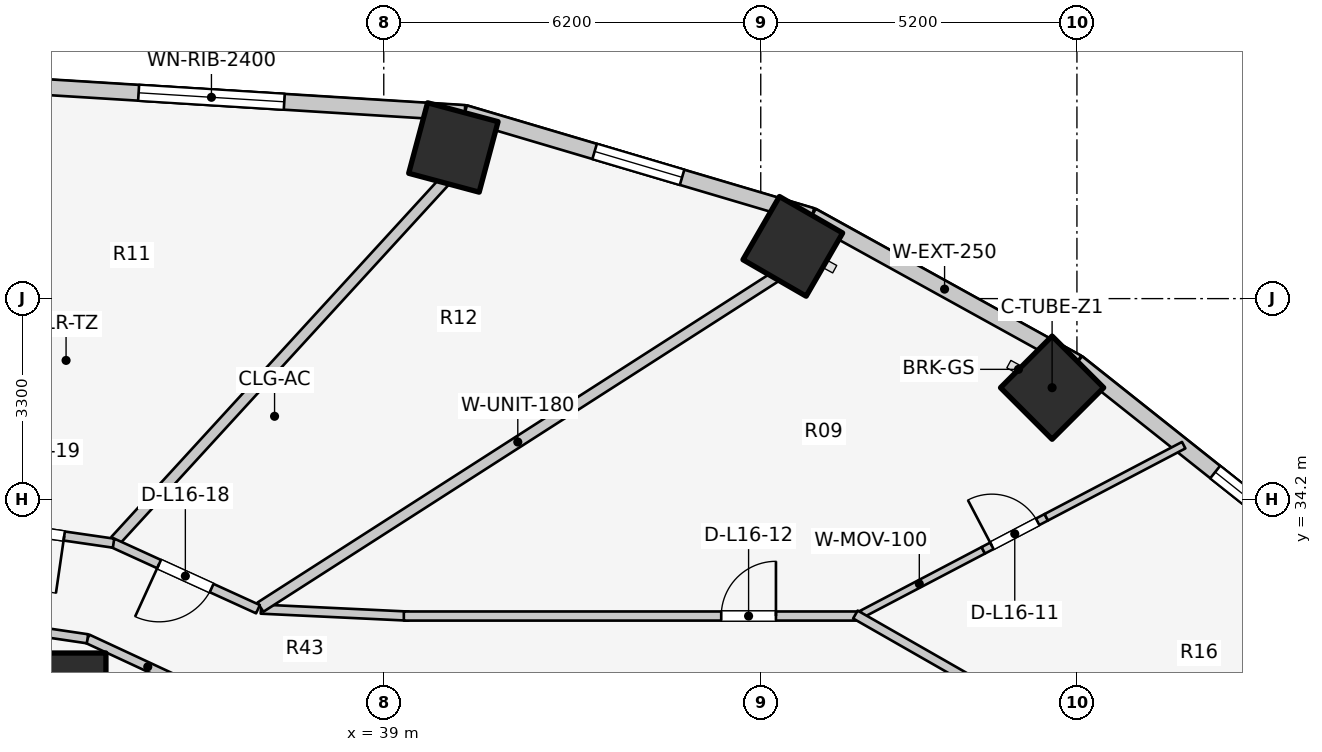
"""IFC4 building model, lengths in metres.
Left out: names, types, materials, properties, quantities, classifications, styles, units other than length and angle.
Written with IfcOpenShell. Run it as: python <this file> out.ifc"""

import sys

from ifc_helpers import new_model, si_unit, direction, frame, frame_2d, origin, origin_2d, place, context, subcontext, project, spatial, rectangle, extrude, element, fill, save


model = new_model("IFC4")
c1 = context("Model", 3, precision=1e-05, world=origin(), true_north=direction((0.0, 1.0)))
c2 = subcontext(c1, "Body", "Model", "MODEL_VIEW")
j1 = project(units=[si_unit("LENGTHUNIT", "METRE"), si_unit("PLANEANGLEUNIT", "RADIAN")], contexts=[c1])
p1 = place(None, origin())
s1 = spatial("IfcSite", under=j1, at=p1, CompositionType="ELEMENT")
p2 = place(p1, origin())
s2 = spatial("IfcBuilding", under=s1, at=p2, CompositionType="ELEMENT")
p3 = place(p2, frame((0.0, 0.0, 55.5)))
s3 = spatial("IfcBuildingStorey", under=s2, at=p3, CompositionType="ELEMENT", Elevation=55.5)
for number, where, z_axis, x_axis in (
    (1, (49.992, 36.035, 0.0), (0.0, 0.0, 1.0), (0.707, 0.707, 0.0)),
    (2, (45.727, 38.359, 0.0), (0.0, 0.0, 1.0), (0.5, 0.866, 0.0)),
):
    element("IfcColumn", number, at=place(p3, frame(where, z_axis=z_axis, x_axis=x_axis)), inside=s3, PredefinedType="COLUMN", context=c2, shape_type="SweptSolid", body=[
        extrude(rectangle(XDim=1.2, YDim=1.2, at=origin_2d()), origin(), (0.0, 0.0, 1.0), 3.1),
    ])
p4 = place(p3, frame((33.931, 31.172, 0.0), z_axis=(0.0, 0.0, 1.0), x_axis=(1.0, 0.0, 0.0)))
e3 = element("IfcColumn", 3, at=p4, inside=s3, PredefinedType="COLUMN", context=c2, shape_type="SweptSolid", body=[
    extrude(rectangle(XDim=1.0, YDim=1.0, at=origin_2d()), origin(), (0.0, 0.0, 1.0), 3.1),
])
p5 = place(p3, frame((40.145, 39.986, 0.0), z_axis=(0.0, 0.0, 1.0), x_axis=(0.258819045103, 0.965925826289, 0.0)))
e4 = element("IfcColumn", 4, at=p5, inside=s3, PredefinedType="COLUMN", context=c2, shape_type="SweptSolid", body=[
    extrude(rectangle(XDim=1.2, YDim=1.2, at=origin_2d()), origin(), (0.0, 0.0, 1.0), 3.1),
])
p6 = place(p3, frame((54.194, 33.441, 0.0), z_axis=(0.0, 0.0, 1.0), x_axis=(-0.783123133379, 0.621866672179, 0.0)))
e5 = element("IfcWall", 5, at=p6, inside=s3, PredefinedType="STANDARD", context=c2, shape_type="SweptSolid", body=[
    extrude(rectangle(XDim=4.839, YDim=0.26, at=frame_2d((2.419, 0.0))), origin(), (0.0, 0.0, 1.0), 2.85),
])
p7 = place(p6, frame((0.741, 0.0, 0.75)))
e6 = element("IfcOpeningElement", 6, at=p7, cuts=e5, PredefinedType="OPENING", context=c2, shape_type="SweptSolid", body=[
    extrude(rectangle(XDim=1.2, YDim=1.5, at=frame_2d((0.6, 0.75))), frame((0.0, 0.14, 0.0), z_axis=(0.0, -1.0, 0.0), x_axis=(1.0, 0.0, 0.0)), (0.0, 0.0, 1.0), 0.28),
])
p8 = place(p3, frame((50.405, 36.45, 0.0), z_axis=(0.0, 0.0, 1.0), x_axis=(-0.875137303239, 0.483874674352, 0.0)))
e7 = element("IfcWall", 7, at=p8, inside=s3, PredefinedType="STANDARD", context=c2, shape_type="SweptSolid", body=[
    extrude(rectangle(XDim=4.985, YDim=0.26, at=frame_2d((2.493, 0.0))), origin(), (0.0, 0.0, 1.0), 2.85),
])
p9 = place(p3, frame((46.042, 38.862, 0.0), z_axis=(0.0, 0.0, 1.0), x_axis=(-0.958843593522, 0.283934786811, 0.0)))
e8 = element("IfcWall", 8, at=p9, inside=s3, PredefinedType="STANDARD", context=c2, shape_type="SweptSolid", body=[
    extrude(rectangle(XDim=5.955, YDim=0.26, at=frame_2d((2.978, 0.0))), origin(), (0.0, 0.0, 1.0), 2.85),
])
p10 = place(p9, frame((2.228, 0.0, 0.75)))
e9 = element("IfcOpeningElement", 9, at=p10, cuts=e8, PredefinedType="OPENING", context=c2, shape_type="SweptSolid", body=[
    extrude(rectangle(XDim=1.5, YDim=1.6, at=frame_2d((0.75, 0.8))), frame((0.0, 0.14, 0.0), z_axis=(0.0, -1.0, 0.0), x_axis=(1.0, 0.0, 0.0)), (0.0, 0.0, 1.0), 0.28),
])
p11 = place(p3, frame((40.332, 40.553, 0.0), z_axis=(0.0, 0.0, 1.0), x_axis=(-0.998090514779, 0.061768311519, 0.0)))
e10 = element("IfcWall", 10, at=p11, inside=s3, PredefinedType="STANDARD", context=c2, shape_type="SweptSolid", body=[
    extrude(rectangle(XDim=8.348, YDim=0.26, at=frame_2d((4.174, 0.0))), origin(), (0.0, 0.0, 1.0), 2.85),
])
p12 = place(p11, frame((2.974, 0.0, 0.75)))
e11 = element("IfcOpeningElement", 11, at=p12, cuts=e10, PredefinedType="OPENING", context=c2, shape_type="SweptSolid", body=[
    extrude(rectangle(XDim=2.4, YDim=1.7, at=frame_2d((1.2, 0.85))), frame((0.0, 0.14, 0.0), z_axis=(0.0, -1.0, 0.0), x_axis=(1.0, 0.0, 0.0)), (0.0, 0.0, 1.0), 0.28),
])
p13 = place(p3, frame((36.11, 30.985, 0.0), z_axis=(0.0, 0.0, 1.0), x_axis=(-0.906943449489, 0.421252393975, 0.0)))
e12 = element("IfcWall", 12, at=p13, inside=s3, PredefinedType="PARTITIONING", context=c2, shape_type="SweptSolid", body=[
    extrude(rectangle(XDim=2.186, YDim=0.15, at=frame_2d((1.093, 0.0))), origin(), (0.0, 0.0, 1.0), 2.237),
])
p14 = place(p3, frame((34.127, 31.906, 0.0), z_axis=(0.0, 0.0, 1.0), x_axis=(-0.989268584896, 0.146108408166, 0.0)))
e13 = element("IfcWall", 13, at=p14, inside=s3, PredefinedType="PARTITIONING", context=c2, shape_type="SweptSolid", body=[
    extrude(rectangle(XDim=2.151, YDim=0.15, at=frame_2d((1.075, 0.0))), origin(), (0.0, 0.0, 1.0), 2.237),
])
p15 = place(p3, frame((46.756, 32.257, 0.0), z_axis=(0.0, 0.0, 1.0), x_axis=(0.885586030676, 0.464475383924, 0.0)))
e14 = element("IfcWall", 14, at=p15, inside=s3, PredefinedType="MOVABLE", context=c2, shape_type="SweptSolid", body=[
    extrude(rectangle(XDim=2.376, YDim=0.12, at=frame_2d((1.188, 0.0))), origin(), (0.0, 0.0, 1.0), 2.855),
])
p16 = place(p3, frame((48.86, 33.36, 0.0), z_axis=(0.0, 0.0, 1.0), x_axis=(0.885447282698, 0.464739829972, 0.0)))
e15 = element("IfcWall", 15, at=p16, inside=s3, PredefinedType="MOVABLE", context=c2, shape_type="SweptSolid", body=[
    extrude(rectangle(XDim=1.17, YDim=0.12, at=frame_2d((0.585, 0.0))), origin(), (0.0, 0.0, 1.0), 2.11),
])
p17 = place(p16, frame((0.16, 0.0, 0.0)))
e16 = element("IfcOpeningElement", 16, at=p17, cuts=e15, PredefinedType="OPENING", context=c2, shape_type="SweptSolid", body=[
    extrude(rectangle(XDim=0.85, YDim=2.05, at=frame_2d((0.425, 1.025))), frame((0.0, 0.07, 0.0), z_axis=(0.0, -1.0, 0.0), x_axis=(1.0, 0.0, 0.0)), (0.0, 0.0, 1.0), 0.14),
])
p18 = place(p3, frame((49.896, 33.904, 0.0), z_axis=(0.0, 0.0, 1.0), x_axis=(0.885573027611, 0.464500175208, 0.0)))
e17 = element("IfcWall", 17, at=p18, inside=s3, PredefinedType="MOVABLE", context=c2, shape_type="SweptSolid", body=[
    extrude(rectangle(XDim=2.552, YDim=0.12, at=frame_2d((1.276, 0.0))), origin(), (0.0, 0.0, 1.0), 2.855),
])
p19 = place(p3, frame((36.98, 32.394, 0.0), z_axis=(0.0, 0.0, 1.0), x_axis=(0.998877427952, -0.047369651964, 0.0)))
e18 = element("IfcWall", 18, at=p19, inside=s3, PredefinedType="PARTITIONING", context=c2, shape_type="SweptSolid", body=[
    extrude(rectangle(XDim=2.433, YDim=0.15, at=frame_2d((1.216, 0.0))), origin(), (0.0, 0.0, 1.0), 2.237),
])
p20 = place(p3, frame((39.33, 32.28, 0.0), z_axis=(0.0, 0.0, 1.0), x_axis=(1.0, 0.0, 0.0)))
e19 = element("IfcWall", 19, at=p20, inside=s3, PredefinedType="PARTITIONING", context=c2, shape_type="SweptSolid", body=[
    extrude(rectangle(XDim=7.52, YDim=0.15, at=frame_2d((3.76, 0.0))), origin(), (0.0, 0.0, 1.0), 2.237),
])
p21 = place(p20, frame((5.22, 0.0, 0.0)))
e20 = element("IfcOpeningElement", 20, at=p21, cuts=e19, PredefinedType="OPENING", context=c2, shape_type="SweptSolid", body=[
    extrude(rectangle(XDim=0.9, YDim=2.1, at=frame_2d((0.45, 1.05))), frame((0.0, 0.085, 0.0), z_axis=(0.0, -1.0, 0.0), x_axis=(1.0, 0.0, 0.0)), (0.0, 0.0, 1.0), 0.17),
])
p22 = place(p3, frame((46.757, 32.305, 0.0), z_axis=(0.0, 0.0, 1.0), x_axis=(0.867991349648, -0.496579315857, 0.0)))
e21 = element("IfcWall", 21, at=p22, inside=s3, PredefinedType="PARTITIONING", context=c2, shape_type="SweptSolid", body=[
    extrude(rectangle(XDim=2.567, YDim=0.15, at=frame_2d((1.283, 0.0))), origin(), (0.0, 0.0, 1.0), 2.069),
])
p23 = place(p3, frame((36.971, 32.426, 0.0), z_axis=(0.0, 0.0, 1.0), x_axis=(0.841689919529, 0.5399611832, 0.0)))
e22 = element("IfcWall", 22, at=p23, inside=s3, PredefinedType="PARTITIONING", context=c2, shape_type="SweptSolid", body=[
    extrude(rectangle(XDim=10.058, YDim=0.18, at=frame_2d((5.029, 0.0))), origin(), (0.0, 0.0, 1.0), 2.237),
])
p24 = place(p3, frame((34.586, 33.521, 0.0), z_axis=(0.0, 0.0, 1.0), x_axis=(0.675465011224, 0.737392038615, 0.0)))
e23 = element("IfcWall", 23, at=p24, inside=s3, PredefinedType="PARTITIONING", context=c2, shape_type="SweptSolid", body=[
    extrude(rectangle(XDim=8.007, YDim=0.18, at=frame_2d((4.003, 0.0))), origin(), (0.0, 0.0, 1.0), 2.237),
])
p25 = place(p3, frame((36.931, 32.393, 0.0), z_axis=(0.0, 0.0, 1.0), x_axis=(-0.909747571199, 0.415161843982, 0.0)))
e24 = element("IfcWall", 24, at=p25, inside=s3, PredefinedType="PARTITIONING", context=c2, shape_type="SweptSolid", body=[
    extrude(rectangle(XDim=2.625, YDim=0.15, at=frame_2d((1.312, 0.0))), origin(), (0.0, 0.0, 1.0), 2.237),
])
p26 = place(p25, frame((0.838, 0.0, 0.0)))
e25 = element("IfcOpeningElement", 25, at=p26, cuts=e24, PredefinedType="OPENING", context=c2, shape_type="SweptSolid", body=[
    extrude(rectangle(XDim=0.95, YDim=2.1, at=frame_2d((0.475, 1.05))), frame((0.0, 0.085, 0.0), z_axis=(0.0, -1.0, 0.0), x_axis=(1.0, 0.0, 0.0)), (0.0, 0.0, 1.0), 0.17),
])
p27 = place(p3, frame((34.556, 33.478, 0.0), z_axis=(0.0, 0.0, 1.0), x_axis=(-0.989637894688, 0.143585644814, 0.0)))
e26 = element("IfcWall", 26, at=p27, inside=s3, PredefinedType="PARTITIONING", context=c2, shape_type="SweptSolid", body=[
    extrude(rectangle(XDim=2.59, YDim=0.15, at=frame_2d((1.295, 0.0))), origin(), (0.0, 0.0, 1.0), 2.237),
])
p28 = place(p27, frame((0.82, 0.0, 0.0)))
e27 = element("IfcOpeningElement", 27, at=p28, cuts=e26, PredefinedType="OPENING", context=c2, shape_type="SweptSolid", body=[
    extrude(rectangle(XDim=0.95, YDim=2.1, at=frame_2d((0.475, 1.05))), frame((0.0, 0.085, 0.0), z_axis=(0.0, -1.0, 0.0), x_axis=(1.0, 0.0, 0.0)), (0.0, 0.0, 1.0), 0.17),
])
p29 = place(p7, origin())
e28 = element("IfcWindow", 28, at=p29, inside=s3, PartitioningType="SINGLE_PANEL", PredefinedType="WINDOW", context=c2, shape_type="SweptSolid", body=[
    extrude(rectangle(XDim=1.2, YDim=1.5, at=frame_2d((0.6, 0.75))), frame((0.0, 0.03, 0.0), z_axis=(0.0, -1.0, 0.0), x_axis=(1.0, 0.0, 0.0)), (0.0, 0.0, 1.0), 0.06),
])
fill(e6, e28)
p30 = place(p10, origin())
e29 = element("IfcWindow", 29, at=p30, inside=s3, PartitioningType="SINGLE_PANEL", PredefinedType="WINDOW", context=c2, shape_type="SweptSolid", body=[
    extrude(rectangle(XDim=1.5, YDim=1.6, at=frame_2d((0.75, 0.8))), frame((0.0, 0.03, 0.0), z_axis=(0.0, -1.0, 0.0), x_axis=(1.0, 0.0, 0.0)), (0.0, 0.0, 1.0), 0.06),
])
fill(e9, e29)
p31 = place(p12, origin())
e30 = element("IfcWindow", 30, at=p31, inside=s3, PartitioningType="SINGLE_PANEL", PredefinedType="WINDOW", context=c2, shape_type="SweptSolid", body=[
    extrude(rectangle(XDim=2.4, YDim=1.7, at=frame_2d((1.2, 0.85))), frame((0.0, 0.03, 0.0), z_axis=(0.0, -1.0, 0.0), x_axis=(1.0, 0.0, 0.0)), (0.0, 0.0, 1.0), 0.06),
])
fill(e11, e30)
p32 = place(p17, origin())
e31 = element("IfcDoor", 31, at=p32, inside=s3, OperationType="SINGLE_SWING_LEFT", PredefinedType="DOOR", context=c2, shape_type="SweptSolid", body=[
    extrude(rectangle(XDim=0.85, YDim=2.05, at=frame_2d((0.425, 1.025))), frame((0.0, 0.025, 0.0), z_axis=(0.0, -1.0, 0.0), x_axis=(1.0, 0.0, 0.0)), (0.0, 0.0, 1.0), 0.05),
])
fill(e16, e31)
p33 = place(p21, origin())
e32 = element("IfcDoor", 32, at=p33, inside=s3, OperationType="SINGLE_SWING_RIGHT", PredefinedType="DOOR", context=c2, shape_type="SweptSolid", body=[
    extrude(rectangle(XDim=0.9, YDim=2.1, at=frame_2d((0.45, 1.05))), frame((0.0, 0.025, 0.0), z_axis=(0.0, -1.0, 0.0), x_axis=(1.0, 0.0, 0.0)), (0.0, 0.0, 1.0), 0.05),
])
fill(e20, e32)
p34 = place(p26, origin())
e33 = element("IfcDoor", 33, at=p34, inside=s3, OperationType="SINGLE_SWING_RIGHT", PredefinedType="DOOR", context=c2, shape_type="SweptSolid", body=[
    extrude(rectangle(XDim=0.95, YDim=2.1, at=frame_2d((0.475, 1.05))), frame((0.0, 0.025, 0.0), z_axis=(0.0, -1.0, 0.0), x_axis=(1.0, 0.0, 0.0)), (0.0, 0.0, 1.0), 0.05),
])
fill(e25, e33)
p35 = place(p28, origin())
e34 = element("IfcDoor", 34, at=p35, inside=s3, OperationType="SINGLE_SWING_LEFT", PredefinedType="DOOR", context=c2, shape_type="SweptSolid", body=[
    extrude(rectangle(XDim=0.95, YDim=2.1, at=frame_2d((0.475, 1.05))), frame((0.0, 0.025, 0.0), z_axis=(0.0, -1.0, 0.0), x_axis=(1.0, 0.0, 0.0)), (0.0, 0.0, 1.0), 0.05),
])
fill(e27, e34)
save(model, sys.argv[1])
